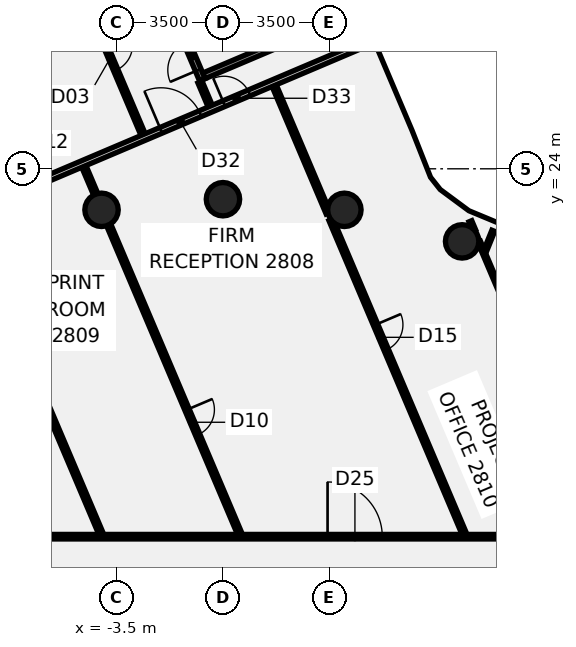
"""IFC4 building model, lengths in metres.
Left out: names, types, materials, properties, quantities, classifications, styles, units other than length and angle.
Written with IfcOpenShell. Run it as: python <this file> out.ifc"""

import sys

from ifc_helpers import new_model, si_unit, direction, frame, frame_2d, origin, origin_2d, place, context, subcontext, project, spatial, rectangle, circle, extrude, element, fill, save


model = new_model("IFC4")
c1 = context("Model", 3, precision=1e-05, world=origin(), true_north=direction((0.0, 1.0)))
c2 = subcontext(c1, "Body", "Model", "MODEL_VIEW")
j1 = project(units=[si_unit("LENGTHUNIT", "METRE"), si_unit("PLANEANGLEUNIT", "RADIAN")], contexts=[c1])
p1 = place(None, origin())
s1 = spatial("IfcSite", under=j1, at=p1, CompositionType="ELEMENT")
p2 = place(p1, origin())
s2 = spatial("IfcBuilding", under=s1, at=p2, CompositionType="ELEMENT")
p3 = place(p2, frame((0.0, 0.0, 117.25)))
s3 = spatial("IfcBuildingStorey", under=s2, at=p3, CompositionType="ELEMENT", Elevation=117.25)
for number, where, z_axis, x_axis in (
    (1, (7.866, 21.613, -0.14), (0.0, 0.0, 1.0), (1.0, 0.0, 0.0)),
    (2, (3.994, 22.651, -0.14), (0.0, 0.0, 1.0), (1.0, 0.0, 0.0)),
    (3, (0.0, 23.0, -0.14), (0.0, 0.0, 1.0), (1.0, 0.0, 0.0)),
    (4, (-3.994, 22.651, -0.14), (0.0, 0.0, 1.0), (1.0, 0.0, 0.0)),
):
    element("IfcColumn", number, at=place(p3, frame(where, z_axis=z_axis, x_axis=x_axis)), inside=s3, PredefinedType="COLUMN", context=c2, shape_type="SweptSolid", body=[
        extrude(circle(Radius=0.55, at=origin_2d()), origin(), (0.0, 0.0, 1.0), 3.75),
    ])
p4 = place(p3, frame((-9.589, 41.532, 0.0), z_axis=(0.0, 0.0, 1.0), x_axis=(0.390623027628, -0.920550732055, 0.0)))
e5 = element("IfcWall", 5, at=p4, inside=s3, PredefinedType="PARTITIONING", context=c2, shape_type="SweptSolid", body=[
    extrude(rectangle(XDim=17.82, YDim=0.15, at=frame_2d((8.91, 0.0))), origin(), (0.0, 0.0, 1.0), 3.01),
])
p5 = place(p4, frame((14.626, 0.0, 0.0)))
e6 = element("IfcOpeningElement", 6, at=p5, cuts=e5, PredefinedType="OPENING", context=c2, shape_type="SweptSolid", body=[
    extrude(rectangle(XDim=0.9, YDim=2.1, at=frame_2d((0.45, 1.05))), frame((0.0, 0.085, 0.0), z_axis=(0.0, -1.0, 0.0), x_axis=(1.0, 0.0, 0.0)), (0.0, 0.0, 1.0), 0.17),
])
p6 = place(p4, frame((11.326, 0.0, 0.0)))
e7 = element("IfcOpeningElement", 7, at=p6, cuts=e5, PredefinedType="OPENING", context=c2, shape_type="SweptSolid", body=[
    extrude(rectangle(XDim=0.9, YDim=2.1, at=frame_2d((0.45, 1.05))), frame((0.0, 0.085, 0.0), z_axis=(0.0, -1.0, 0.0), x_axis=(1.0, 0.0, 0.0)), (0.0, 0.0, 1.0), 0.17),
])
p7 = place(p4, frame((5.625, 0.0, 0.0)))
e8 = element("IfcOpeningElement", 8, at=p7, cuts=e5, PredefinedType="OPENING", context=c2, shape_type="SweptSolid", body=[
    extrude(rectangle(XDim=0.9, YDim=2.1, at=frame_2d((0.45, 1.05))), frame((0.0, 0.085, 0.0), z_axis=(0.0, -1.0, 0.0), x_axis=(1.0, 0.0, 0.0)), (0.0, 0.0, 1.0), 0.17),
])
p8 = place(p4, frame((1.275, 0.0, 0.0)))
e9 = element("IfcOpeningElement", 9, at=p8, cuts=e5, PredefinedType="OPENING", context=c2, shape_type="SweptSolid", body=[
    extrude(rectangle(XDim=0.9, YDim=2.1, at=frame_2d((0.45, 1.05))), frame((0.0, 0.085, 0.0), z_axis=(0.0, -1.0, 0.0), x_axis=(1.0, 0.0, 0.0)), (0.0, 0.0, 1.0), 0.17),
])
p9 = place(p3, frame((-7.855, 21.056, 0.0), z_axis=(0.0, 0.0, 1.0), x_axis=(0.390527569726, -0.920591232461, 0.0)))
e10 = element("IfcWall", 10, at=p9, inside=s3, PredefinedType="PARTITIONING", context=c2, shape_type="SweptSolid", body=[
    extrude(rectangle(XDim=9.851, YDim=0.15, at=frame_2d((4.925, 0.0))), origin(), (0.0, 0.0, 1.0), 3.01),
])
p10 = place(p3, frame((-0.754, 26.851, 0.0), z_axis=(0.0, 0.0, 1.0), x_axis=(0.390645109707, -0.920541361516, 0.0)))
e11 = element("IfcWall", 11, at=p10, inside=s3, PredefinedType="PARTITIONING", context=c2, shape_type="SweptSolid", body=[
    extrude(rectangle(XDim=0.855, YDim=0.15, at=frame_2d((0.428, 0.0))), origin(), (0.0, 0.0, 1.0), 3.01),
])
p11 = place(p3, frame((-4.575, 24.079, 0.0), z_axis=(0.0, 0.0, 1.0), x_axis=(0.390612620021, -0.92055514831, 0.0)))
e12 = element("IfcWall", 12, at=p11, inside=s3, PredefinedType="PARTITIONING", context=c2, shape_type="SweptSolid", body=[
    extrude(rectangle(XDim=0.999, YDim=0.15, at=frame_2d((0.5, 0.0))), origin(), (0.0, 0.0, 1.0), 3.01),
])
p12 = place(p3, frame((-3.758, 22.154, 0.0), z_axis=(0.0, 0.0, 1.0), x_axis=(0.390495909229, -0.92060466264, 0.0)))
e13 = element("IfcWall", 13, at=p12, inside=s3, PredefinedType="PARTITIONING", context=c2, shape_type="SweptSolid", body=[
    extrude(rectangle(XDim=11.043, YDim=0.15, at=frame_2d((5.521, 0.0))), origin(), (0.0, 0.0, 1.0), 3.01),
])
p13 = place(p12, frame((6.6, 0.0, 0.0)))
e14 = element("IfcOpeningElement", 14, at=p13, cuts=e13, PredefinedType="OPENING", context=c2, shape_type="SweptSolid", body=[
    extrude(rectangle(XDim=0.9, YDim=2.1, at=frame_2d((0.45, 1.05))), frame((0.0, 0.085, 0.0), z_axis=(0.0, -1.0, 0.0), x_axis=(1.0, 0.0, 0.0)), (0.0, 0.0, 1.0), 0.17),
])
p14 = place(p3, frame((1.685, 26.734, 0.0), z_axis=(0.0, 0.0, 1.0), x_axis=(0.390486499232, -0.920608654053, 0.0)))
e15 = element("IfcWall", 15, at=p14, inside=s3, PredefinedType="PARTITIONING", context=c2, shape_type="SweptSolid", body=[
    extrude(rectangle(XDim=4.553, YDim=0.15, at=frame_2d((2.276, 0.0))), origin(), (0.0, 0.0, 1.0), 3.01),
])
p15 = place(p3, frame((3.556, 22.324, 0.0), z_axis=(0.0, 0.0, 1.0), x_axis=(0.390483953043, -0.920609734043, 0.0)))
e16 = element("IfcWall", 16, at=p15, inside=s3, PredefinedType="PARTITIONING", context=c2, shape_type="SweptSolid", body=[
    extrude(rectangle(XDim=11.228, YDim=0.15, at=frame_2d((5.614, 0.0))), origin(), (0.0, 0.0, 1.0), 3.01),
])
p16 = place(p15, frame((3.75, 0.0, 0.0)))
e17 = element("IfcOpeningElement", 17, at=p16, cuts=e16, PredefinedType="OPENING", context=c2, shape_type="SweptSolid", body=[
    extrude(rectangle(XDim=0.9, YDim=2.1, at=frame_2d((0.45, 1.05))), frame((0.0, 0.085, 0.0), z_axis=(0.0, -1.0, 0.0), x_axis=(1.0, 0.0, 0.0)), (0.0, 0.0, 1.0), 0.17),
])
p17 = place(p3, frame((8.138, 22.275, 0.0), z_axis=(0.0, 0.0, 1.0), x_axis=(0.390313983978, -0.920681809265, 0.0)))
e18 = element("IfcWall", 18, at=p17, inside=s3, PredefinedType="PARTITIONING", context=c2, shape_type="SweptSolid", body=[
    extrude(rectangle(XDim=0.319, YDim=0.1, at=frame_2d((0.16, 0.0))), origin(), (0.0, 0.0, 1.0), 3.01),
])
p18 = place(p3, frame((8.424, 21.603, 0.0), z_axis=(0.0, 0.0, 1.0), x_axis=(0.390568116641, -0.920574030844, 0.0)))
e19 = element("IfcWall", 19, at=p18, inside=s3, PredefinedType="PARTITIONING", context=c2, shape_type="SweptSolid", body=[
    extrude(rectangle(XDim=10.295, YDim=0.1, at=frame_2d((5.147, 0.0))), origin(), (0.0, 0.0, 1.0), 3.01),
])
p19 = place(p3, frame((-17.065, 11.9, 0.0), z_axis=(0.0, 0.0, 1.0), x_axis=(1.0, 0.0, 0.0)))
e20 = element("IfcWall", 20, at=p19, inside=s3, PredefinedType="PARTITIONING", context=c2, shape_type="SweptSolid", body=[
    extrude(rectangle(XDim=34.165, YDim=0.15, at=frame_2d((17.083, 0.0))), origin(), (0.0, 0.0, 1.0), 3.01),
])
p20 = place(p19, frame((20.506, 0.0, 0.0)))
e21 = element("IfcOpeningElement", 21, at=p20, cuts=e20, PredefinedType="OPENING", context=c2, shape_type="SweptSolid", body=[
    extrude(rectangle(XDim=1.8, YDim=2.1, at=frame_2d((0.9, 1.05))), frame((0.0, 0.085, 0.0), z_axis=(0.0, -1.0, 0.0), x_axis=(1.0, 0.0, 0.0)), (0.0, 0.0, 1.0), 0.17),
])
p21 = place(p19, frame((31.056, 0.0, 0.0)))
e22 = element("IfcOpeningElement", 22, at=p21, cuts=e20, PredefinedType="OPENING", context=c2, shape_type="SweptSolid", body=[
    extrude(rectangle(XDim=1.8, YDim=2.1, at=frame_2d((0.9, 1.05))), frame((0.0, 0.085, 0.0), z_axis=(0.0, -1.0, 0.0), x_axis=(1.0, 0.0, 0.0)), (0.0, 0.0, 1.0), 0.17),
])
p22 = place(p19, frame((5.665, 0.0, 0.0)))
e23 = element("IfcOpeningElement", 23, at=p22, cuts=e20, PredefinedType="OPENING", context=c2, shape_type="SweptSolid", body=[
    extrude(rectangle(XDim=1.8, YDim=2.1, at=frame_2d((0.9, 1.05))), frame((0.0, 0.085, 0.0), z_axis=(0.0, -1.0, 0.0), x_axis=(1.0, 0.0, 0.0)), (0.0, 0.0, 1.0), 0.17),
])
p23 = place(p3, frame((-7.765, 27.722, 0.0), z_axis=(0.0, 0.0, 1.0), x_axis=(0.920627091649, 0.390443028011, 0.0)))
e24 = element("IfcWall", 24, at=p23, inside=s3, PredefinedType="PARTITIONING", context=c2, shape_type="SweptSolid", body=[
    extrude(rectangle(XDim=3.639, YDim=0.1, at=frame_2d((1.82, 0.0))), origin(), (0.0, 0.0, 1.0), 3.01),
])
p24 = place(p3, frame((-8.406, 22.561, 0.0), z_axis=(0.0, 0.0, 1.0), x_axis=(0.920508060844, 0.390723572262, 0.0)))
e25 = element("IfcWall", 25, at=p24, inside=s3, PredefinedType="PARTITIONING", context=c2, shape_type="SweptSolid", body=[
    extrude(rectangle(XDim=14.219, YDim=0.2, at=frame_2d((7.109, 0.0))), origin(), (0.0, 0.0, 1.0), 3.01),
])
p25 = place(p24, frame((6.919, 0.0, 0.0)))
e26 = element("IfcOpeningElement", 26, at=p25, cuts=e25, PredefinedType="OPENING", context=c2, shape_type="SweptSolid", body=[
    extrude(rectangle(XDim=1.4, YDim=2.1, at=frame_2d((0.7, 1.05))), frame((0.0, 0.11, 0.0), z_axis=(0.0, -1.0, 0.0), x_axis=(1.0, 0.0, 0.0)), (0.0, 0.0, 1.0), 0.22),
])
p26 = place(p24, frame((9.17, 0.0, 0.0)))
e27 = element("IfcOpeningElement", 27, at=p26, cuts=e25, PredefinedType="OPENING", context=c2, shape_type="SweptSolid", body=[
    extrude(rectangle(XDim=0.9, YDim=2.1, at=frame_2d((0.45, 1.05))), frame((0.0, 0.11, 0.0), z_axis=(0.0, -1.0, 0.0), x_axis=(1.0, 0.0, 0.0)), (0.0, 0.0, 1.0), 0.22),
])
p27 = place(p3, frame((8.627, 21.307, 0.0), z_axis=(0.0, 0.0, 1.0), x_axis=(0.375263513238, 0.926918170947, 0.0)))
e28 = element("IfcWall", 28, at=p27, inside=s3, PredefinedType="PARTITIONING", context=c2, shape_type="SweptSolid", body=[
    extrude(rectangle(XDim=0.706, YDim=0.1, at=frame_2d((0.353, 0.0))), origin(), (0.0, 0.0, 1.0), 3.01),
])
p28 = place(p3, frame((-0.677, 26.927, -0.14), z_axis=(0.0, 0.0, 1.0), x_axis=(-0.390517094017, 0.920595676332, 0.0)))
e29 = element("IfcWall", 29, at=p28, inside=s3, PredefinedType="SHEAR", context=c2, shape_type="SweptSolid", body=[
    extrude(rectangle(XDim=6.7, YDim=0.2, at=frame_2d((3.35, 0.0))), origin(), (0.0, 0.0, 1.0), 3.15),
])
p29 = place(p28, frame((0.35, 0.0, 0.0)))
e30 = element("IfcOpeningElement", 30, at=p29, cuts=e29, PredefinedType="OPENING", context=c2, shape_type="SweptSolid", body=[
    extrude(rectangle(XDim=1.0, YDim=2.1, at=frame_2d((0.5, 1.05))), frame((0.0, 0.11, 0.0), z_axis=(0.0, -1.0, 0.0), x_axis=(1.0, 0.0, 0.0)), (0.0, 0.0, 1.0), 0.22),
])
p30 = place(p3, frame((2.321, 28.307, -0.14), z_axis=(0.0, 0.0, 1.0), x_axis=(-0.920579288157, -0.390555724853, 0.0)))
e31 = element("IfcWall", 31, at=p30, inside=s3, PredefinedType="SHEAR", context=c2, shape_type="SweptSolid", body=[
    extrude(rectangle(XDim=3.2, YDim=0.2, at=frame_2d((1.6, 0.0))), origin(), (0.0, 0.0, 1.0), 3.15),
])
p31 = place(p5, frame((0.9, 0.0, 0.0), z_axis=(0.0, 0.0, 1.0), x_axis=(-1.0, 0.0, 0.0)))
e32 = element("IfcDoor", 32, at=p31, inside=s3, OperationType="SINGLE_SWING_RIGHT", PredefinedType="DOOR", context=c2, shape_type="SweptSolid", body=[
    extrude(rectangle(XDim=0.9, YDim=2.1, at=frame_2d((0.45, 1.05))), frame((0.0, 0.025, 0.0), z_axis=(0.0, -1.0, 0.0), x_axis=(1.0, 0.0, 0.0)), (0.0, 0.0, 1.0), 0.05),
])
fill(e6, e32)
p32 = place(p13, frame((0.9, 0.0, 0.0), z_axis=(0.0, 0.0, 1.0), x_axis=(-1.0, 0.0, 0.0)))
e33 = element("IfcDoor", 33, at=p32, inside=s3, OperationType="SINGLE_SWING_RIGHT", PredefinedType="DOOR", context=c2, shape_type="SweptSolid", body=[
    extrude(rectangle(XDim=0.9, YDim=2.1, at=frame_2d((0.45, 1.05))), frame((0.0, 0.025, 0.0), z_axis=(0.0, -1.0, 0.0), x_axis=(1.0, 0.0, 0.0)), (0.0, 0.0, 1.0), 0.05),
])
fill(e14, e33)
p33 = place(p16, origin())
e34 = element("IfcDoor", 34, at=p33, inside=s3, OperationType="SINGLE_SWING_RIGHT", PredefinedType="DOOR", context=c2, shape_type="SweptSolid", body=[
    extrude(rectangle(XDim=0.9, YDim=2.1, at=frame_2d((0.45, 1.05))), frame((0.0, 0.025, 0.0), z_axis=(0.0, -1.0, 0.0), x_axis=(1.0, 0.0, 0.0)), (0.0, 0.0, 1.0), 0.05),
])
fill(e17, e34)
p34 = place(p20, frame((1.8, 0.0, 0.0), z_axis=(0.0, 0.0, 1.0), x_axis=(-1.0, 0.0, 0.0)))
e35 = element("IfcDoor", 35, at=p34, inside=s3, OperationType="DOUBLE_DOOR_SINGLE_SWING", PredefinedType="DOOR", context=c2, shape_type="SweptSolid", body=[
    extrude(rectangle(XDim=1.8, YDim=2.1, at=frame_2d((0.9, 1.05))), frame((0.0, 0.025, 0.0), z_axis=(0.0, -1.0, 0.0), x_axis=(1.0, 0.0, 0.0)), (0.0, 0.0, 1.0), 0.05),
])
fill(e21, e35)
p35 = place(p25, frame((1.4, 0.0, 0.0), z_axis=(0.0, 0.0, 1.0), x_axis=(-1.0, 0.0, 0.0)))
e36 = element("IfcDoor", 36, at=p35, inside=s3, OperationType="DOUBLE_DOOR_SINGLE_SWING", PredefinedType="DOOR", context=c2, shape_type="SweptSolid", body=[
    extrude(rectangle(XDim=1.4, YDim=2.1, at=frame_2d((0.7, 1.05))), frame((0.0, 0.025, 0.0), z_axis=(0.0, -1.0, 0.0), x_axis=(1.0, 0.0, 0.0)), (0.0, 0.0, 1.0), 0.05),
])
fill(e26, e36)
p36 = place(p26, origin())
e37 = element("IfcDoor", 37, at=p36, inside=s3, OperationType="SINGLE_SWING_LEFT", PredefinedType="DOOR", context=c2, shape_type="SweptSolid", body=[
    extrude(rectangle(XDim=0.9, YDim=2.1, at=frame_2d((0.45, 1.05))), frame((0.0, 0.025, 0.0), z_axis=(0.0, -1.0, 0.0), x_axis=(1.0, 0.0, 0.0)), (0.0, 0.0, 1.0), 0.05),
])
fill(e27, e37)
p37 = place(p29, origin())
e38 = element("IfcDoor", 38, at=p37, inside=s3, OperationType="SINGLE_SWING_LEFT", PredefinedType="DOOR", context=c2, shape_type="SweptSolid", body=[
    extrude(rectangle(XDim=1.0, YDim=2.1, at=frame_2d((0.5, 1.05))), frame((0.0, 0.025, 0.0), z_axis=(0.0, -1.0, 0.0), x_axis=(1.0, 0.0, 0.0)), (0.0, 0.0, 1.0), 0.05),
])
fill(e30, e38)
save(model, sys.argv[1])
